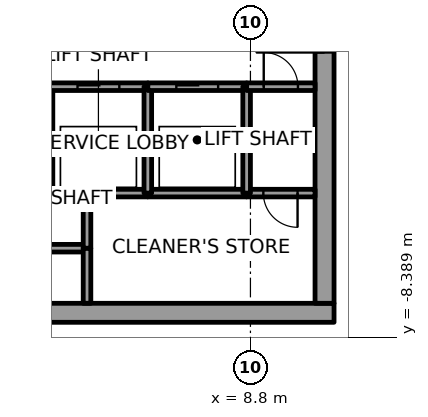
"""IFC4 building model, lengths in metres.
Left out: names, types, materials, properties, quantities, classifications, styles, units other than length and angle.
Written with IfcOpenShell. Run it as: python <this file> out.ifc"""

import sys

from ifc_helpers import new_model, si_unit, direction, frame, frame_2d, origin, place, context, subcontext, project, spatial, rectangle, extrude, element, fill, save


model = new_model("IFC4")
c1 = context("Model", 3, precision=1e-05, world=origin(), true_north=direction((0.0, 1.0)))
c2 = subcontext(c1, "Body", "Model", "MODEL_VIEW")
j1 = project(units=[si_unit("LENGTHUNIT", "METRE"), si_unit("PLANEANGLEUNIT", "RADIAN")], contexts=[c1])
p1 = place(None, origin())
s1 = spatial("IfcSite", under=j1, at=p1, CompositionType="ELEMENT")
p2 = place(p1, origin())
s2 = spatial("IfcBuilding", under=s1, at=p2, CompositionType="ELEMENT")
p3 = place(p2, frame((0.0, 0.0, 185.8)))
s3 = spatial("IfcBuildingStorey", under=s2, at=p3, CompositionType="ELEMENT", Elevation=185.8)
p4 = place(p3, frame((-11.0, -7.75, 0.0), z_axis=(0.0, 0.0, 1.0), x_axis=(1.0, 0.0, 0.0)))
e1 = element("IfcWall", 1, at=p4, inside=s3, PredefinedType="SHEAR", context=c2, shape_type="SweptSolid", body=[
    extrude(rectangle(XDim=22.0, YDim=0.5, at=frame_2d((11.0, 0.0))), origin(), (0.0, 0.0, 1.0), 4.0),
])
p5 = place(p4, frame((10.45, 0.0, 0.0)))
e2 = element("IfcOpeningElement", 2, at=p5, cuts=e1, PredefinedType="OPENING", context=c2, shape_type="SweptSolid", body=[
    extrude(rectangle(XDim=1.1, YDim=2.1, at=frame_2d((0.55, 1.05))), frame((0.0, 0.25, 0.0), z_axis=(0.0, -1.0, 0.0), x_axis=(1.0, 0.0, 0.0)), (0.0, 0.0, 1.0), 0.5),
])
p6 = place(p3, frame((10.75, -7.5, 0.0), z_axis=(0.0, 0.0, 1.0), x_axis=(0.0, 1.0, 0.0)))
e3 = element("IfcWall", 3, at=p6, inside=s3, PredefinedType="SHEAR", context=c2, shape_type="SweptSolid", body=[
    extrude(rectangle(XDim=15.0, YDim=0.5, at=frame_2d((7.5, 0.0))), origin(), (0.0, 0.0, 1.0), 4.0),
])
p7 = place(p6, frame((6.6, 0.0, 0.0)))
e4 = element("IfcOpeningElement", 4, at=p7, cuts=e3, PredefinedType="OPENING", context=c2, shape_type="SweptSolid", body=[
    extrude(rectangle(XDim=1.8, YDim=2.1, at=frame_2d((0.9, 1.05))), frame((0.0, 0.25, 0.0), z_axis=(0.0, -1.0, 0.0), x_axis=(1.0, 0.0, 0.0)), (0.0, 0.0, 1.0), 0.5),
])
p8 = place(p3, frame((4.5, -6.05, 0.0), z_axis=(0.0, 0.0, 1.0), x_axis=(-1.0, 0.0, 0.0)))
e5 = element("IfcWall", 5, at=p8, inside=s3, PredefinedType="SOLIDWALL", context=c2, shape_type="SweptSolid", body=[
    extrude(rectangle(XDim=3.6, YDim=0.2, at=frame_2d((1.8, 0.0))), origin(), (0.0, 0.0, 1.0), 3.85),
])
p9 = place(p3, frame((4.5, -4.6, 0.0), z_axis=(0.0, 0.0, 1.0), x_axis=(-1.0, 0.0, 0.0)))
e6 = element("IfcWall", 6, at=p9, inside=s3, PredefinedType="SOLIDWALL", context=c2, shape_type="SweptSolid", body=[
    extrude(rectangle(XDim=1.0, YDim=0.2, at=frame_2d((0.5, 0.0))), origin(), (0.0, 0.0, 1.0), 3.85),
])
p10 = place(p3, frame((3.5, -1.8, 0.0), z_axis=(0.0, 0.0, 1.0), x_axis=(1.0, 0.0, 0.0)))
e7 = element("IfcWall", 7, at=p10, inside=s3, PredefinedType="SOLIDWALL", context=c2, shape_type="SweptSolid", body=[
    extrude(rectangle(XDim=2.6, YDim=0.2, at=frame_2d((1.3, 0.0))), origin(), (0.0, 0.0, 1.0), 3.85),
])
p11 = place(p10, frame((0.75, 0.0, 0.0)))
e8 = element("IfcOpeningElement", 8, at=p11, cuts=e7, PredefinedType="OPENING", context=c2, shape_type="SweptSolid", body=[
    extrude(rectangle(XDim=1.1, YDim=2.1, at=frame_2d((0.55, 1.05))), frame((0.0, 0.1, 0.0), z_axis=(0.0, -1.0, 0.0), x_axis=(1.0, 0.0, 0.0)), (0.0, 0.0, 1.0), 0.2),
])
for number, where, z_axis, x_axis in (
    (9, (4.5, -6.05, 0.0), (0.0, 0.0, 1.0), (0.0, -1.0, 0.0)),
    (10, (4.5, -4.6, 0.0), (0.0, 0.0, 1.0), (0.0, -1.0, 0.0)),
):
    element("IfcWall", number, at=place(p3, frame(where, z_axis=z_axis, x_axis=x_axis)), inside=s3, PredefinedType="SOLIDWALL", context=c2, shape_type="SweptSolid", body=[
        extrude(rectangle(XDim=1.45, YDim=0.2, at=frame_2d((0.725, 0.0))), origin(), (0.0, 0.0, 1.0), 3.85),
    ])
p12 = place(p3, frame((6.1, -4.6, 0.0), z_axis=(0.0, 0.0, 1.0), x_axis=(-1.0, 0.0, 0.0)))
e11 = element("IfcWall", 11, at=p12, inside=s3, PredefinedType="SOLIDWALL", context=c2, shape_type="SweptSolid", body=[
    extrude(rectangle(XDim=1.6, YDim=0.2, at=frame_2d((0.8, 0.0))), origin(), (0.0, 0.0, 1.0), 3.85),
])
p13 = place(p3, frame((8.7, -4.6, 0.0), z_axis=(0.0, 0.0, 1.0), x_axis=(-1.0, 0.0, 0.0)))
e12 = element("IfcWall", 12, at=p13, inside=s3, PredefinedType="SOLIDWALL", context=c2, shape_type="SweptSolid", body=[
    extrude(rectangle(XDim=2.6, YDim=0.2, at=frame_2d((1.3, 0.0))), origin(), (0.0, 0.0, 1.0), 3.85),
])
p14 = place(p3, frame((6.1, -4.6, 0.0), z_axis=(0.0, 0.0, 1.0), x_axis=(0.0, 1.0, 0.0)))
e13 = element("IfcWall", 13, at=p14, inside=s3, PredefinedType="SOLIDWALL", context=c2, shape_type="SweptSolid", body=[
    extrude(rectangle(XDim=2.8, YDim=0.2, at=frame_2d((1.4, 0.0))), origin(), (0.0, 0.0, 1.0), 3.85),
])
p15 = place(p3, frame((6.1, -1.8, 0.0), z_axis=(0.0, 0.0, 1.0), x_axis=(1.0, 0.0, 0.0)))
e14 = element("IfcWall", 14, at=p15, inside=s3, PredefinedType="SOLIDWALL", context=c2, shape_type="SweptSolid", body=[
    extrude(rectangle(XDim=2.6, YDim=0.2, at=frame_2d((1.3, 0.0))), origin(), (0.0, 0.0, 1.0), 3.85),
])
p16 = place(p15, frame((0.75, 0.0, 0.0)))
e15 = element("IfcOpeningElement", 15, at=p16, cuts=e14, PredefinedType="OPENING", context=c2, shape_type="SweptSolid", body=[
    extrude(rectangle(XDim=1.1, YDim=2.1, at=frame_2d((0.55, 1.05))), frame((0.0, 0.1, 0.0), z_axis=(0.0, -1.0, 0.0), x_axis=(1.0, 0.0, 0.0)), (0.0, 0.0, 1.0), 0.2),
])
p17 = place(p3, frame((10.5, -4.6, 0.0), z_axis=(0.0, 0.0, 1.0), x_axis=(-1.0, 0.0, 0.0)))
e16 = element("IfcWall", 16, at=p17, inside=s3, PredefinedType="SOLIDWALL", context=c2, shape_type="SweptSolid", body=[
    extrude(rectangle(XDim=1.8, YDim=0.2, at=frame_2d((0.9, 0.0))), origin(), (0.0, 0.0, 1.0), 3.85),
])
p18 = place(p17, frame((0.46, 0.0, 0.0)))
e17 = element("IfcOpeningElement", 17, at=p18, cuts=e16, PredefinedType="OPENING", context=c2, shape_type="SweptSolid", body=[
    extrude(rectangle(XDim=0.9, YDim=2.1, at=frame_2d((0.45, 1.05))), frame((0.0, 0.1, 0.0), z_axis=(0.0, -1.0, 0.0), x_axis=(1.0, 0.0, 0.0)), (0.0, 0.0, 1.0), 0.2),
])
p19 = place(p3, frame((8.7, -1.8, 0.0), z_axis=(0.0, 0.0, 1.0), x_axis=(0.0, -1.0, 0.0)))
e18 = element("IfcWall", 18, at=p19, inside=s3, PredefinedType="SOLIDWALL", context=c2, shape_type="SweptSolid", body=[
    extrude(rectangle(XDim=2.8, YDim=0.2, at=frame_2d((1.4, 0.0))), origin(), (0.0, 0.0, 1.0), 3.85),
])
p20 = place(p3, frame((8.7, -1.8, 0.0), z_axis=(0.0, 0.0, 1.0), x_axis=(1.0, 0.0, 0.0)))
e19 = element("IfcWall", 19, at=p20, inside=s3, PredefinedType="SOLIDWALL", context=c2, shape_type="SweptSolid", body=[
    extrude(rectangle(XDim=1.8, YDim=0.2, at=frame_2d((0.9, 0.0))), origin(), (0.0, 0.0, 1.0), 3.85),
])
p21 = place(p20, frame((0.45, 0.0, 0.0)))
e20 = element("IfcOpeningElement", 20, at=p21, cuts=e19, PredefinedType="OPENING", context=c2, shape_type="SweptSolid", body=[
    extrude(rectangle(XDim=0.9, YDim=2.1, at=frame_2d((0.45, 1.05))), frame((0.0, 0.1, 0.0), z_axis=(0.0, -1.0, 0.0), x_axis=(1.0, 0.0, 0.0)), (0.0, 0.0, 1.0), 0.2),
])
p22 = place(p11, origin())
e21 = element("IfcDoor", 21, at=p22, inside=s3, OperationType="SLIDING_TO_LEFT", PredefinedType="DOOR", context=c2, shape_type="SweptSolid", body=[
    extrude(rectangle(XDim=1.1, YDim=2.1, at=frame_2d((0.55, 1.05))), frame((0.0, 0.025, 0.0), z_axis=(0.0, -1.0, 0.0), x_axis=(1.0, 0.0, 0.0)), (0.0, 0.0, 1.0), 0.05),
])
fill(e8, e21)
p23 = place(p16, origin())
e22 = element("IfcDoor", 22, at=p23, inside=s3, OperationType="SLIDING_TO_RIGHT", PredefinedType="DOOR", context=c2, shape_type="SweptSolid", body=[
    extrude(rectangle(XDim=1.1, YDim=2.1, at=frame_2d((0.55, 1.05))), frame((0.0, 0.025, 0.0), z_axis=(0.0, -1.0, 0.0), x_axis=(1.0, 0.0, 0.0)), (0.0, 0.0, 1.0), 0.05),
])
fill(e15, e22)
p24 = place(p18, origin())
e23 = element("IfcDoor", 23, at=p24, inside=s3, OperationType="SINGLE_SWING_LEFT", PredefinedType="DOOR", context=c2, shape_type="SweptSolid", body=[
    extrude(rectangle(XDim=0.9, YDim=2.1, at=frame_2d((0.45, 1.05))), frame((0.0, 0.025, 0.0), z_axis=(0.0, -1.0, 0.0), x_axis=(1.0, 0.0, 0.0)), (0.0, 0.0, 1.0), 0.05),
])
fill(e17, e23)
p25 = place(p21, origin())
e24 = element("IfcDoor", 24, at=p25, inside=s3, OperationType="SINGLE_SWING_LEFT", PredefinedType="DOOR", context=c2, shape_type="SweptSolid", body=[
    extrude(rectangle(XDim=0.9, YDim=2.1, at=frame_2d((0.45, 1.05))), frame((0.0, 0.025, 0.0), z_axis=(0.0, -1.0, 0.0), x_axis=(1.0, 0.0, 0.0)), (0.0, 0.0, 1.0), 0.05),
])
fill(e20, e24)
p26 = place(p7, origin())
e25 = element("IfcDoor", 25, at=p26, inside=s3, OperationType="DOUBLE_DOOR_SINGLE_SWING", PredefinedType="DOOR", context=c2, shape_type="SweptSolid", body=[
    extrude(rectangle(XDim=1.8, YDim=2.1, at=frame_2d((0.9, 1.05))), frame((0.0, 0.025, 0.0), z_axis=(0.0, -1.0, 0.0), x_axis=(1.0, 0.0, 0.0)), (0.0, 0.0, 1.0), 0.05),
])
fill(e4, e25)
save(model, sys.argv[1])
